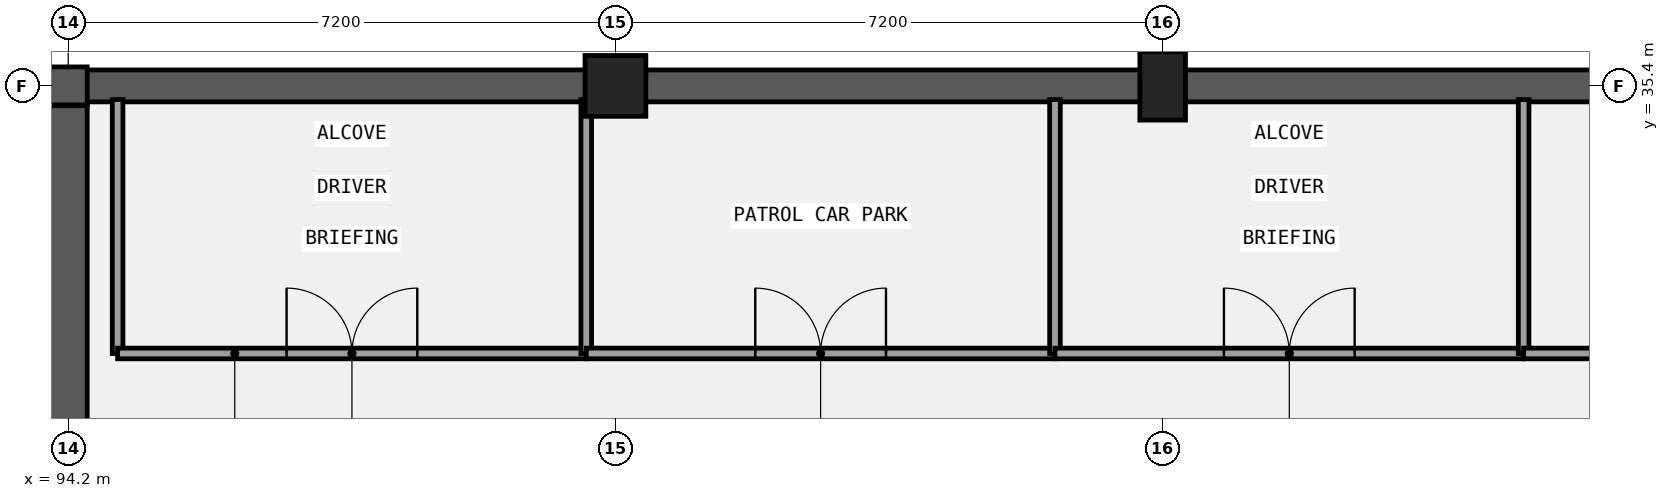
"""IFC4 building model, lengths in metres.
Left out: names, types, materials, properties, quantities, classifications, styles, units other than length and angle.
Written with IfcOpenShell. Run it as: python <this file> out.ifc"""

import sys

from ifc_helpers import new_model, si_unit, direction, frame, frame_2d, origin, origin_2d, place, context, subcontext, project, spatial, rectangle, extrude, element, fill, save


model = new_model("IFC4")
c1 = context("Model", 3, precision=1e-05, world=origin(), true_north=direction((0.0, 1.0)))
c2 = subcontext(c1, "Body", "Model", "MODEL_VIEW")
j1 = project(units=[si_unit("LENGTHUNIT", "METRE"), si_unit("PLANEANGLEUNIT", "RADIAN")], contexts=[c1])
p1 = place(None, origin())
s1 = spatial("IfcSite", under=j1, at=p1, CompositionType="ELEMENT")
p2 = place(p1, origin())
s2 = spatial("IfcBuilding", under=s1, at=p2, CompositionType="ELEMENT")
p3 = place(p2, frame((0.0, 0.0, -4.2)))
s3 = spatial("IfcBuildingStorey", under=s2, at=p3, CompositionType="ELEMENT", Elevation=-4.2)
p4 = place(p3, frame((94.43, 35.4, 0.0), z_axis=(0.0, 0.0, 1.0), x_axis=(1.0, 0.0, 0.0)))
e1 = element("IfcWall", 1, at=p4, inside=s3, PredefinedType="USERDEFINED", context=c2, shape_type="SweptSolid", body=[
    extrude(rectangle(XDim=50.38, YDim=0.42, at=frame_2d((25.19, 0.0))), origin(), (0.0, 0.0, 1.0), 2.98),
])
p5 = place(p3, frame((79.55, 35.4, 0.0), z_axis=(0.0, 0.0, 1.0), x_axis=(1.0, 0.0, 0.0)))
e2 = element("IfcWall", 2, at=p5, inside=s3, PredefinedType="SHEAR", context=c2, shape_type="SweptSolid", body=[
    extrude(rectangle(XDim=14.9, YDim=0.5, at=frame_2d((7.45, 0.0))), origin(), (0.0, 0.0, 1.0), 4.2),
])
p6 = place(p3, frame((94.2, 28.46, 0.0), z_axis=(0.0, 0.0, 1.0), x_axis=(0.0, 1.0, 0.0)))
e3 = element("IfcWall", 3, at=p6, inside=s3, PredefinedType="SHEAR", context=c2, shape_type="SweptSolid", body=[
    extrude(rectangle(XDim=6.68, YDim=0.5, at=frame_2d((3.34, 0.0))), origin(), (0.0, 0.0, 1.0), 4.2),
])
p7 = place(p3, frame((101.4, 35.4, 0.0), z_axis=(0.0, 0.0, 1.0), x_axis=(1.0, 0.0, 0.0)))
e4 = element("IfcColumn", 4, at=p7, inside=s3, PredefinedType="COLUMN", context=c2, shape_type="SweptSolid", body=[
    extrude(rectangle(XDim=0.8, YDim=0.8, at=origin_2d()), origin(), (0.0, 0.0, 1.0), 4.2),
])
p8 = place(p3, frame((108.6, 35.4, 0.0), z_axis=(0.0, 0.0, 1.0), x_axis=(1.0, 0.0, 0.0)))
e5 = element("IfcColumn", 5, at=p8, inside=s3, PredefinedType="COLUMN", context=c2, shape_type="SweptSolid", body=[
    extrude(rectangle(XDim=0.6, YDim=0.9, at=origin_2d()), origin(), (0.0, 0.0, 1.0), 4.2),
])
p9 = place(p3, frame((94.85, 31.88, 0.0), z_axis=(0.0, 0.0, 1.0), x_axis=(0.0, 1.0, 0.0)))
e6 = element("IfcWall", 6, at=p9, inside=s3, PredefinedType="PARTITIONING", context=c2, shape_type="SweptSolid", body=[
    extrude(rectangle(XDim=3.34, YDim=0.14, at=frame_2d((1.67, 0.0))), origin(), (0.0, 0.0, 1.0), 3.88),
])
p10 = place(p3, frame((94.85, 31.88, 0.0), z_axis=(0.0, 0.0, 1.0), x_axis=(1.0, 0.0, 0.0)))
e7 = element("IfcWall", 7, at=p10, inside=s3, PredefinedType="PARTITIONING", context=c2, shape_type="SweptSolid", body=[
    extrude(rectangle(XDim=6.166, YDim=0.14, at=frame_2d((3.083, 0.0))), origin(), (0.0, 0.0, 1.0), 3.88),
])
p11 = place(p10, frame((2.223, 0.0, 0.0)))
e8 = element("IfcOpeningElement", 8, at=p11, cuts=e7, PredefinedType="OPENING", context=c2, shape_type="SweptSolid", body=[
    extrude(rectangle(XDim=1.72, YDim=2.1, at=frame_2d((0.86, 1.05))), frame((0.0, 0.08, 0.0), z_axis=(0.0, -1.0, 0.0), x_axis=(1.0, 0.0, 0.0)), (0.0, 0.0, 1.0), 0.16),
])
p12 = place(p3, frame((101.016, 31.88, 0.0), z_axis=(0.0, 0.0, 1.0), x_axis=(0.0, 1.0, 0.0)))
e9 = element("IfcWall", 9, at=p12, inside=s3, PredefinedType="PARTITIONING", context=c2, shape_type="SweptSolid", body=[
    extrude(rectangle(XDim=3.34, YDim=0.14, at=frame_2d((1.67, 0.0))), origin(), (0.0, 0.0, 1.0), 3.88),
])
p13 = place(p3, frame((101.016, 31.88, 0.0), z_axis=(0.0, 0.0, 1.0), x_axis=(1.0, 0.0, 0.0)))
e10 = element("IfcWall", 10, at=p13, inside=s3, PredefinedType="PARTITIONING", context=c2, shape_type="SweptSolid", body=[
    extrude(rectangle(XDim=6.167, YDim=0.14, at=frame_2d((3.083, 0.0))), origin(), (0.0, 0.0, 1.0), 3.33),
])
p14 = place(p13, frame((2.223, 0.0, 0.0)))
e11 = element("IfcOpeningElement", 11, at=p14, cuts=e10, PredefinedType="OPENING", context=c2, shape_type="SweptSolid", body=[
    extrude(rectangle(XDim=1.72, YDim=2.22, at=frame_2d((0.86, 1.11))), frame((0.0, 0.08, 0.0), z_axis=(0.0, -1.0, 0.0), x_axis=(1.0, 0.0, 0.0)), (0.0, 0.0, 1.0), 0.16),
])
p15 = place(p3, frame((107.183, 31.88, 0.0), z_axis=(0.0, 0.0, 1.0), x_axis=(0.0, 1.0, 0.0)))
e12 = element("IfcWall", 12, at=p15, inside=s3, PredefinedType="PARTITIONING", context=c2, shape_type="SweptSolid", body=[
    extrude(rectangle(XDim=3.34, YDim=0.14, at=frame_2d((1.67, 0.0))), origin(), (0.0, 0.0, 1.0), 3.88),
])
p16 = place(p3, frame((107.183, 31.88, 0.0), z_axis=(0.0, 0.0, 1.0), x_axis=(1.0, 0.0, 0.0)))
e13 = element("IfcWall", 13, at=p16, inside=s3, PredefinedType="PARTITIONING", context=c2, shape_type="SweptSolid", body=[
    extrude(rectangle(XDim=6.166, YDim=0.14, at=frame_2d((3.083, 0.0))), origin(), (0.0, 0.0, 1.0), 3.33),
])
p17 = place(p16, frame((2.223, 0.0, 0.0)))
e14 = element("IfcOpeningElement", 14, at=p17, cuts=e13, PredefinedType="OPENING", context=c2, shape_type="SweptSolid", body=[
    extrude(rectangle(XDim=1.72, YDim=2.35, at=frame_2d((0.86, 1.175))), frame((0.0, 0.08, 0.0), z_axis=(0.0, -1.0, 0.0), x_axis=(1.0, 0.0, 0.0)), (0.0, 0.0, 1.0), 0.16),
])
p18 = place(p3, frame((113.349, 31.88, 0.0), z_axis=(0.0, 0.0, 1.0), x_axis=(0.0, 1.0, 0.0)))
e15 = element("IfcWall", 15, at=p18, inside=s3, PredefinedType="PARTITIONING", context=c2, shape_type="SweptSolid", body=[
    extrude(rectangle(XDim=3.34, YDim=0.14, at=frame_2d((1.67, 0.0))), origin(), (0.0, 0.0, 1.0), 3.88),
])
p19 = place(p3, frame((113.349, 31.88, 0.0), z_axis=(0.0, 0.0, 1.0), x_axis=(1.0, 0.0, 0.0)))
e16 = element("IfcWall", 16, at=p19, inside=s3, PredefinedType="PARTITIONING", context=c2, shape_type="SweptSolid", body=[
    extrude(rectangle(XDim=6.166, YDim=0.14, at=frame_2d((3.083, 0.0))), origin(), (0.0, 0.0, 1.0), 3.33),
])
p20 = place(p19, frame((2.623, 0.0, 0.0)))
e17 = element("IfcOpeningElement", 17, at=p20, cuts=e16, PredefinedType="OPENING", context=c2, shape_type="SweptSolid", body=[
    extrude(rectangle(XDim=0.92, YDim=2.1, at=frame_2d((0.46, 1.05))), frame((0.0, 0.08, 0.0), z_axis=(0.0, -1.0, 0.0), x_axis=(1.0, 0.0, 0.0)), (0.0, 0.0, 1.0), 0.16),
])
p21 = place(p11, origin())
e18 = element("IfcDoor", 18, at=p21, inside=s3, OperationType="DOUBLE_DOOR_SINGLE_SWING", PredefinedType="DOOR", context=c2, shape_type="SweptSolid", body=[
    extrude(rectangle(XDim=1.72, YDim=2.1, at=frame_2d((0.86, 1.05))), frame((0.0, 0.025, 0.0), z_axis=(0.0, -1.0, 0.0), x_axis=(1.0, 0.0, 0.0)), (0.0, 0.0, 1.0), 0.05),
])
fill(e8, e18)
p22 = place(p14, origin())
e19 = element("IfcDoor", 19, at=p22, inside=s3, OperationType="DOUBLE_DOOR_SINGLE_SWING", PredefinedType="DOOR", context=c2, shape_type="SweptSolid", body=[
    extrude(rectangle(XDim=1.72, YDim=2.22, at=frame_2d((0.86, 1.11))), frame((0.0, 0.025, 0.0), z_axis=(0.0, -1.0, 0.0), x_axis=(1.0, 0.0, 0.0)), (0.0, 0.0, 1.0), 0.05),
])
fill(e11, e19)
p23 = place(p17, origin())
e20 = element("IfcDoor", 20, at=p23, inside=s3, OperationType="DOUBLE_DOOR_SINGLE_SWING", PredefinedType="DOOR", context=c2, shape_type="SweptSolid", body=[
    extrude(rectangle(XDim=1.72, YDim=2.35, at=frame_2d((0.86, 1.175))), frame((0.0, 0.025, 0.0), z_axis=(0.0, -1.0, 0.0), x_axis=(1.0, 0.0, 0.0)), (0.0, 0.0, 1.0), 0.05),
])
fill(e14, e20)
save(model, sys.argv[1])
